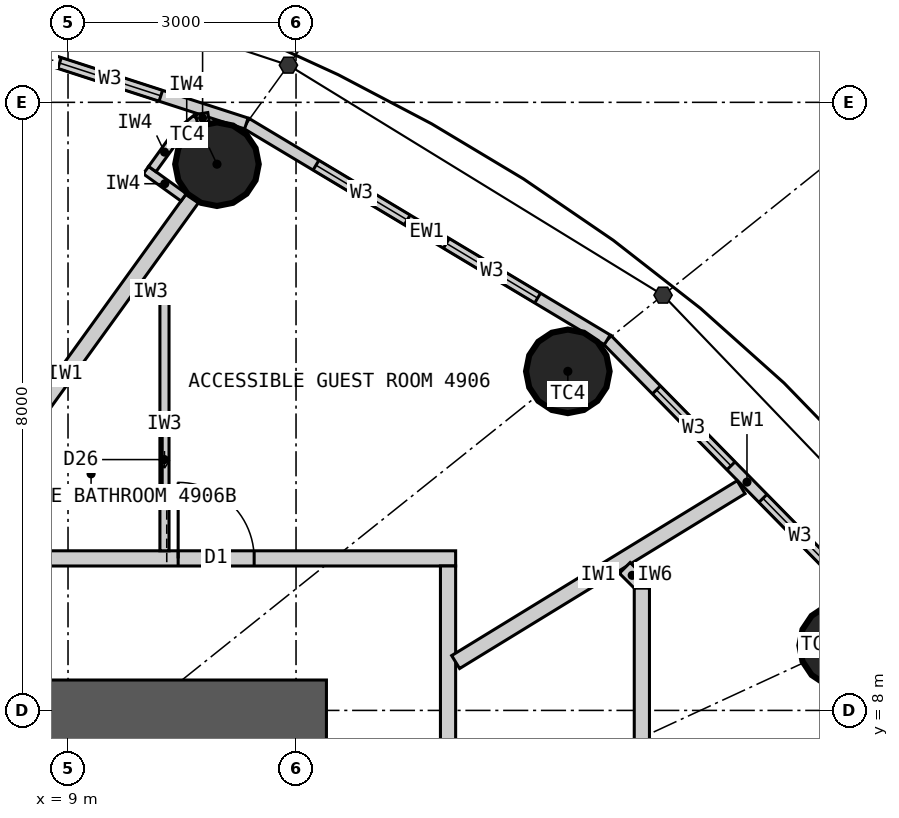
"""IFC4 building model, lengths in metres.
Left out: names, types, materials, properties, quantities, classifications, styles, units other than length and angle.
Written with IfcOpenShell. Run it as: python <this file> out.ifc"""

import sys

from ifc_helpers import new_model, si_unit, direction, frame, frame_2d, origin, origin_2d, place, context, subcontext, project, spatial, rectangle, circle, extrude, clip, halfspace, element, fill, save


model = new_model("IFC4")
c1 = context("Model", 3, precision=1e-05, world=origin(), true_north=direction((0.0, 1.0)))
c2 = subcontext(c1, "Body", "Model", "MODEL_VIEW")
j1 = project(units=[si_unit("LENGTHUNIT", "METRE"), si_unit("PLANEANGLEUNIT", "RADIAN")], contexts=[c1])
p1 = place(None, origin())
s1 = spatial("IfcSite", under=j1, at=p1, CompositionType="ELEMENT")
p2 = place(p1, origin())
s2 = spatial("IfcBuilding", under=s1, at=p2, CompositionType="ELEMENT")
p3 = place(p2, frame((0.0, 0.0, 183.0)))
s3 = spatial("IfcBuildingStorey", under=s2, at=p3, CompositionType="ELEMENT", Elevation=183.0)
for number, where, z_axis, x_axis in (
    (1, (19.172, 8.855, 0.0), (0.0, 0.0, 1.0), (1.0, 0.0, 0.0)),
    (2, (15.576, 12.461, 0.0), (0.0, 0.0, 1.0), (1.0, 0.0, 0.0)),
    (3, (10.96, 15.186, 0.0), (0.0, 0.0, 1.0), (1.0, 0.0, 0.0)),
):
    element("IfcColumn", number, at=place(p3, frame(where, z_axis=z_axis, x_axis=x_axis)), inside=s3, PredefinedType="COLUMN", context=c2, shape_type="Clipping", body=[
        clip(extrude(circle(Radius=0.55, at=origin_2d()), origin(), (0.0, 0.0, 1.0), 3.3), halfspace(frame((0.0, 0.0, 2.25), z_axis=(0.0, 0.0, 1.0), x_axis=(1.0, 0.0, 0.0)), False)),
    ])
p4 = place(p3, frame((-12.4, 8.0, 0.0), z_axis=(0.0, 0.0, 1.0), x_axis=(1.0, 0.0, 0.0)))
e4 = element("IfcWall", 4, at=p4, inside=s3, PredefinedType="SHEAR", context=c2, shape_type="SweptSolid", body=[
    extrude(rectangle(XDim=24.8, YDim=0.8, at=frame_2d((12.4, 0.0))), origin(), (0.0, 0.0, 1.0), 3.3),
])
p5 = place(p4, frame((11.1, 0.0, 0.0)))
e5 = element("IfcOpeningElement", 5, at=p5, cuts=e4, PredefinedType="OPENING", context=c2, shape_type="SweptSolid", body=[
    extrude(rectangle(XDim=1.2, YDim=2.2, at=frame_2d((0.6, 1.1))), frame((0.0, 0.41, 0.0), z_axis=(0.0, -1.0, 0.0), x_axis=(1.0, 0.0, 0.0)), (0.0, 0.0, 1.0), 0.82),
])
p6 = place(p4, frame((18.7, 0.0, 0.0)))
e6 = element("IfcOpeningElement", 6, at=p6, cuts=e4, PredefinedType="OPENING", context=c2, shape_type="SweptSolid", body=[
    extrude(rectangle(XDim=0.9, YDim=2.2, at=frame_2d((0.45, 1.1))), frame((0.0, 0.41, 0.0), z_axis=(0.0, -1.0, 0.0), x_axis=(1.0, 0.0, 0.0)), (0.0, 0.0, 1.0), 0.82),
])
p7 = place(p3, frame((19.772, 9.132, 0.0), z_axis=(0.0, 0.0, 1.0), x_axis=(-0.700727467776, 0.71342905457, 0.0)))
e7 = element("IfcWall", 7, at=p7, inside=s3, PredefinedType="ELEMENTEDWALL", context=c2, shape_type="SweptSolid", body=[
    extrude(rectangle(XDim=5.247, YDim=0.15, at=frame_2d((2.624, 0.0))), origin(), (0.0, 0.0, 1.0), 3.05),
])
p8 = place(p7, frame((0.924, 0.0, 0.9)))
e8 = element("IfcOpeningElement", 8, at=p8, cuts=e7, PredefinedType="OPENING", context=c2, shape_type="SweptSolid", body=[
    extrude(rectangle(XDim=1.4, YDim=1.9, at=frame_2d((0.7, 0.95))), frame((0.0, 0.085, 0.0), z_axis=(0.0, -1.0, 0.0), x_axis=(1.0, 0.0, 0.0)), (0.0, 0.0, 1.0), 0.17),
])
p9 = place(p7, frame((2.924, 0.0, 0.9)))
e9 = element("IfcOpeningElement", 9, at=p9, cuts=e7, PredefinedType="OPENING", context=c2, shape_type="SweptSolid", body=[
    extrude(rectangle(XDim=1.4, YDim=1.9, at=frame_2d((0.7, 0.95))), frame((0.0, 0.085, 0.0), z_axis=(0.0, -1.0, 0.0), x_axis=(1.0, 0.0, 0.0)), (0.0, 0.0, 1.0), 0.17),
])
p10 = place(p3, frame((16.095, 12.876, 0.0), z_axis=(0.0, 0.0, 1.0), x_axis=(-0.857695199231, 0.514158482587, 0.0)))
e10 = element("IfcWall", 10, at=p10, inside=s3, PredefinedType="ELEMENTEDWALL", context=c2, shape_type="SweptSolid", body=[
    extrude(rectangle(XDim=5.536, YDim=0.15, at=frame_2d((2.768, 0.0))), origin(), (0.0, 0.0, 1.0), 3.05),
])
p11 = place(p10, frame((1.068, 0.0, 0.9)))
e11 = element("IfcOpeningElement", 11, at=p11, cuts=e10, PredefinedType="OPENING", context=c2, shape_type="SweptSolid", body=[
    extrude(rectangle(XDim=1.4, YDim=1.9, at=frame_2d((0.7, 0.95))), frame((0.0, 0.085, 0.0), z_axis=(0.0, -1.0, 0.0), x_axis=(1.0, 0.0, 0.0)), (0.0, 0.0, 1.0), 0.17),
])
p12 = place(p10, frame((3.068, 0.0, 0.9)))
e12 = element("IfcOpeningElement", 12, at=p12, cuts=e10, PredefinedType="OPENING", context=c2, shape_type="SweptSolid", body=[
    extrude(rectangle(XDim=1.4, YDim=1.9, at=frame_2d((0.7, 0.95))), frame((0.0, 0.085, 0.0), z_axis=(0.0, -1.0, 0.0), x_axis=(1.0, 0.0, 0.0)), (0.0, 0.0, 1.0), 0.17),
])
p13 = place(p3, frame((11.346, 15.722, 0.0), z_axis=(0.0, 0.0, 1.0), x_axis=(-0.951432482129, 0.307857486429, 0.0)))
e13 = element("IfcWall", 13, at=p13, inside=s3, PredefinedType="ELEMENTEDWALL", context=c2, shape_type="SweptSolid", body=[
    extrude(rectangle(XDim=5.766, YDim=0.15, at=frame_2d((2.883, 0.0))), origin(), (0.0, 0.0, 1.0), 3.05),
])
p14 = place(p13, frame((1.183, 0.0, 0.9)))
e14 = element("IfcOpeningElement", 14, at=p14, cuts=e13, PredefinedType="OPENING", context=c2, shape_type="SweptSolid", body=[
    extrude(rectangle(XDim=1.4, YDim=1.9, at=frame_2d((0.7, 0.95))), frame((0.0, 0.085, 0.0), z_axis=(0.0, -1.0, 0.0), x_axis=(1.0, 0.0, 0.0)), (0.0, 0.0, 1.0), 0.17),
])
p15 = place(p13, frame((3.183, 0.0, 0.9)))
e15 = element("IfcOpeningElement", 15, at=p15, cuts=e13, PredefinedType="OPENING", context=c2, shape_type="SweptSolid", body=[
    extrude(rectangle(XDim=1.4, YDim=1.9, at=frame_2d((0.7, 0.95))), frame((0.0, 0.085, 0.0), z_axis=(0.0, -1.0, 0.0), x_axis=(1.0, 0.0, 0.0)), (0.0, 0.0, 1.0), 0.17),
])
p16 = place(p3, frame((-14.1, 10.0, 0.0), z_axis=(0.0, 0.0, 1.0), x_axis=(1.0, 0.0, 0.0)))
e16 = element("IfcWall", 16, at=p16, inside=s3, PredefinedType="PARTITIONING", context=c2, shape_type="SweptSolid", body=[
    extrude(rectangle(XDim=28.2, YDim=0.2, at=frame_2d((14.1, 0.0))), origin(), (0.0, 0.0, 1.0), 3.05),
])
p17 = place(p16, frame((24.549, 0.0, 0.0)))
e17 = element("IfcOpeningElement", 17, at=p17, cuts=e16, PredefinedType="OPENING", context=c2, shape_type="SweptSolid", body=[
    extrude(rectangle(XDim=1.0, YDim=2.2, at=frame_2d((0.5, 1.1))), frame((0.0, 0.11, 0.0), z_axis=(0.0, -1.0, 0.0), x_axis=(1.0, 0.0, 0.0)), (0.0, 0.0, 1.0), 0.22),
])
p18 = place(p16, frame((18.829, 0.0, 0.0)))
e18 = element("IfcOpeningElement", 18, at=p18, cuts=e16, PredefinedType="OPENING", context=c2, shape_type="SweptSolid", body=[
    extrude(rectangle(XDim=1.0, YDim=2.2, at=frame_2d((0.5, 1.1))), frame((0.0, 0.11, 0.0), z_axis=(0.0, -1.0, 0.0), x_axis=(1.0, 0.0, 0.0)), (0.0, 0.0, 1.0), 0.22),
])
p19 = place(p16, frame((12.8, 0.0, 0.0)))
e19 = element("IfcOpeningElement", 19, at=p19, cuts=e16, PredefinedType="OPENING", context=c2, shape_type="SweptSolid", body=[
    extrude(rectangle(XDim=1.0, YDim=2.2, at=frame_2d((0.5, 1.1))), frame((0.0, 0.11, 0.0), z_axis=(0.0, -1.0, 0.0), x_axis=(1.0, 0.0, 0.0)), (0.0, 0.0, 1.0), 0.22),
])
p20 = place(p16, frame((5.25, 0.0, 0.0)))
e20 = element("IfcOpeningElement", 20, at=p20, cuts=e16, PredefinedType="OPENING", context=c2, shape_type="SweptSolid", body=[
    extrude(rectangle(XDim=1.0, YDim=2.2, at=frame_2d((0.5, 1.1))), frame((0.0, 0.11, 0.0), z_axis=(0.0, -1.0, 0.0), x_axis=(1.0, 0.0, 0.0)), (0.0, 0.0, 1.0), 0.22),
])
p21 = place(p3, frame((14.0, -9.9, 0.0), z_axis=(0.0, 0.0, 1.0), x_axis=(0.0, 1.0, 0.0)))
e21 = element("IfcWall", 21, at=p21, inside=s3, PredefinedType="PARTITIONING", context=c2, shape_type="SweptSolid", body=[
    extrude(rectangle(XDim=19.8, YDim=0.2, at=frame_2d((9.9, 0.0))), origin(), (0.0, 0.0, 1.0), 3.05),
])
p22 = place(p21, frame((1.1, 0.0, 0.0)))
e22 = element("IfcOpeningElement", 22, at=p22, cuts=e21, PredefinedType="OPENING", context=c2, shape_type="SweptSolid", body=[
    extrude(rectangle(XDim=1.0, YDim=2.2, at=frame_2d((0.5, 1.1))), frame((0.0, 0.11, 0.0), z_axis=(0.0, -1.0, 0.0), x_axis=(1.0, 0.0, 0.0)), (0.0, 0.0, 1.0), 0.22),
])
p23 = place(p21, frame((10.832, 0.0, 0.0)))
e23 = element("IfcOpeningElement", 23, at=p23, cuts=e21, PredefinedType="OPENING", context=c2, shape_type="SweptSolid", body=[
    extrude(rectangle(XDim=1.0, YDim=2.2, at=frame_2d((0.5, 1.1))), frame((0.0, 0.11, 0.0), z_axis=(0.0, -1.0, 0.0), x_axis=(1.0, 0.0, 0.0)), (0.0, 0.0, 1.0), 0.22),
])
p24 = place(p3, frame((14.1, 8.636, 0.0), z_axis=(0.0, 0.0, 1.0), x_axis=(0.852731884196, 0.522348862041, 0.0)))
e24 = element("IfcWall", 24, at=p24, inside=s3, PredefinedType="PARTITIONING", context=c2, shape_type="SweptSolid", body=[
    extrude(rectangle(XDim=4.404, YDim=0.2, at=frame_2d((2.202, 0.0))), origin(), (0.0, 0.0, 1.0), 3.05),
])
p25 = place(p3, frame((7.289, 10.1, 0.0), z_axis=(0.0, 0.0, 1.0), x_axis=(0.585222595178, 0.810872686735, 0.0)))
e25 = element("IfcWall", 25, at=p25, inside=s3, PredefinedType="PARTITIONING", context=c2, shape_type="SweptSolid", body=[
    extrude(rectangle(XDim=5.722, YDim=0.2, at=frame_2d((2.861, 0.0))), origin(), (0.0, 0.0, 1.0), 2.15),
])
p26 = place(p3, frame((16.55, -5.35, 0.0), z_axis=(0.0, 0.0, 1.0), x_axis=(0.0, 1.0, 0.0)))
e26 = element("IfcWall", 26, at=p26, inside=s3, PredefinedType="PARTITIONING", context=c2, shape_type="SweptSolid", body=[
    extrude(rectangle(XDim=14.959, YDim=0.2, at=frame_2d((7.479, 0.0))), origin(), (0.0, 0.0, 1.0), 3.05),
])
p27 = place(p26, frame((2.598, 0.0, 0.0)))
e27 = element("IfcOpeningElement", 27, at=p27, cuts=e26, PredefinedType="OPENING", context=c2, shape_type="SweptSolid", body=[
    extrude(rectangle(XDim=0.8, YDim=2.1, at=frame_2d((0.4, 1.05))), frame((0.0, 0.11, 0.0), z_axis=(0.0, -1.0, 0.0), x_axis=(1.0, 0.0, 0.0)), (0.0, 0.0, 1.0), 0.22),
])
p28 = place(p26, frame((11.27, 0.0, 0.0)))
e28 = element("IfcOpeningElement", 28, at=p28, cuts=e26, PredefinedType="OPENING", context=c2, shape_type="SweptSolid", body=[
    extrude(rectangle(XDim=0.8, YDim=2.1, at=frame_2d((0.4, 1.05))), frame((0.0, 0.11, 0.0), z_axis=(0.0, -1.0, 0.0), x_axis=(1.0, 0.0, 0.0)), (0.0, 0.0, 1.0), 0.22),
])
p29 = place(p26, frame((6.757, 0.0, 0.0)))
e29 = element("IfcOpeningElement", 29, at=p29, cuts=e26, PredefinedType="OPENING", context=c2, shape_type="SweptSolid", body=[
    extrude(rectangle(XDim=0.9, YDim=2.1, at=frame_2d((0.45, 1.05))), frame((0.0, 0.11, 0.0), z_axis=(0.0, -1.0, 0.0), x_axis=(1.0, 0.0, 0.0)), (0.0, 0.0, 1.0), 0.22),
])
p30 = place(p3, frame((16.521, 9.679, 0.0), z_axis=(0.0, 0.0, 1.0), x_axis=(-0.707106781187, 0.707106781187, 0.0)))
e30 = element("IfcWall", 30, at=p30, inside=s3, PredefinedType="PARTITIONING", context=c2, shape_type="SweptSolid", body=[
    extrude(rectangle(XDim=0.277, YDim=0.2, at=frame_2d((0.138, 0.0))), origin(), (0.0, 0.0, 1.0), 3.05),
])
p31 = place(p3, frame((9.843, 13.5, 0.0), z_axis=(0.0, 0.0, 1.0), x_axis=(1.0, 0.0, 0.0)))
e31 = element("IfcWall", 31, at=p31, inside=s3, PredefinedType="PARTITIONING", context=c2, shape_type="SweptSolid", body=[
    extrude(rectangle(XDim=0.486, YDim=0.12, at=frame_2d((0.243, 0.0))), origin(), (0.0, 0.0, 1.0), 3.05),
])
p32 = place(p3, frame((10.269, 10.1, 0.0), z_axis=(0.0, 0.0, 1.0), x_axis=(0.0, 1.0, 0.0)))
e32 = element("IfcWall", 32, at=p32, inside=s3, PredefinedType="PARTITIONING", context=c2, shape_type="SweptSolid", body=[
    extrude(rectangle(XDim=3.34, YDim=0.12, at=frame_2d((1.67, 0.0))), origin(), (0.0, 0.0, 1.0), 3.05),
])
p33 = place(p32, frame((0.75, 0.0, 0.0)))
e33 = element("IfcOpeningElement", 33, at=p33, cuts=e32, PredefinedType="OPENING", context=c2, shape_type="SweptSolid", body=[
    extrude(rectangle(XDim=0.9, YDim=2.1, at=frame_2d((0.45, 1.05))), frame((0.0, 0.07, 0.0), z_axis=(0.0, -1.0, 0.0), x_axis=(1.0, 0.0, 0.0)), (0.0, 0.0, 1.0), 0.14),
])
p34 = place(p3, frame((10.522, 14.75, 0.0), z_axis=(0.0, 0.0, 1.0), x_axis=(-0.811057588427, 0.584966313777, 0.0)))
e34 = element("IfcWall", 34, at=p34, inside=s3, PredefinedType="PARTITIONING", context=c2, shape_type="SweptSolid", body=[
    extrude(rectangle(XDim=0.612, YDim=0.12, at=frame_2d((0.306, 0.0))), origin(), (0.0, 0.0, 1.0), 3.05),
])
p35 = place(p3, frame((10.109, 15.122, 0.0), z_axis=(0.0, 0.0, 1.0), x_axis=(0.585344718358, 0.810784534072, 0.0)))
e35 = element("IfcWall", 35, at=p35, inside=s3, PredefinedType="PARTITIONING", context=c2, shape_type="SweptSolid", body=[
    extrude(rectangle(XDim=0.55, YDim=0.12, at=frame_2d((0.275, 0.0))), origin(), (0.0, 0.0, 1.0), 3.05),
])
p36 = place(p3, frame((10.431, 15.568, 0.0), z_axis=(0.0, 0.0, 1.0), x_axis=(0.77505137267, 0.631898227345, 0.0)))
e36 = element("IfcWall", 36, at=p36, inside=s3, PredefinedType="PARTITIONING", context=c2, shape_type="SweptSolid", body=[
    extrude(rectangle(XDim=0.338, YDim=0.12, at=frame_2d((0.169, 0.0))), origin(), (0.0, 0.0, 1.0), 3.05),
])
p37 = place(p3, frame((10.693, 15.781, 0.0), z_axis=(0.0, 0.0, 1.0), x_axis=(0.987256785332, 0.159135287777, 0.0)))
e37 = element("IfcWall", 37, at=p37, inside=s3, PredefinedType="PARTITIONING", context=c2, shape_type="SweptSolid", body=[
    extrude(rectangle(XDim=0.158, YDim=0.12, at=frame_2d((0.079, 0.0))), origin(), (0.0, 0.0, 1.0), 3.05),
])
p38 = place(p8, origin())
e38 = element("IfcWindow", 38, at=p38, inside=s3, PartitioningType="SINGLE_PANEL", PredefinedType="WINDOW", context=c2, shape_type="SweptSolid", body=[
    extrude(rectangle(XDim=1.4, YDim=1.9, at=frame_2d((0.7, 0.95))), frame((0.0, 0.03, 0.0), z_axis=(0.0, -1.0, 0.0), x_axis=(1.0, 0.0, 0.0)), (0.0, 0.0, 1.0), 0.06),
])
fill(e8, e38)
p39 = place(p9, origin())
e39 = element("IfcWindow", 39, at=p39, inside=s3, PartitioningType="SINGLE_PANEL", PredefinedType="WINDOW", context=c2, shape_type="SweptSolid", body=[
    extrude(rectangle(XDim=1.4, YDim=1.9, at=frame_2d((0.7, 0.95))), frame((0.0, 0.03, 0.0), z_axis=(0.0, -1.0, 0.0), x_axis=(1.0, 0.0, 0.0)), (0.0, 0.0, 1.0), 0.06),
])
fill(e9, e39)
p40 = place(p11, origin())
e40 = element("IfcWindow", 40, at=p40, inside=s3, PartitioningType="SINGLE_PANEL", PredefinedType="WINDOW", context=c2, shape_type="SweptSolid", body=[
    extrude(rectangle(XDim=1.4, YDim=1.9, at=frame_2d((0.7, 0.95))), frame((0.0, 0.03, 0.0), z_axis=(0.0, -1.0, 0.0), x_axis=(1.0, 0.0, 0.0)), (0.0, 0.0, 1.0), 0.06),
])
fill(e11, e40)
p41 = place(p12, origin())
e41 = element("IfcWindow", 41, at=p41, inside=s3, PartitioningType="SINGLE_PANEL", PredefinedType="WINDOW", context=c2, shape_type="SweptSolid", body=[
    extrude(rectangle(XDim=1.4, YDim=1.9, at=frame_2d((0.7, 0.95))), frame((0.0, 0.03, 0.0), z_axis=(0.0, -1.0, 0.0), x_axis=(1.0, 0.0, 0.0)), (0.0, 0.0, 1.0), 0.06),
])
fill(e12, e41)
p42 = place(p14, origin())
e42 = element("IfcWindow", 42, at=p42, inside=s3, PartitioningType="SINGLE_PANEL", PredefinedType="WINDOW", context=c2, shape_type="SweptSolid", body=[
    extrude(rectangle(XDim=1.4, YDim=1.9, at=frame_2d((0.7, 0.95))), frame((0.0, 0.03, 0.0), z_axis=(0.0, -1.0, 0.0), x_axis=(1.0, 0.0, 0.0)), (0.0, 0.0, 1.0), 0.06),
])
fill(e14, e42)
p43 = place(p33, origin())
e43 = element("IfcDoor", 43, at=p43, inside=s3, OperationType="SLIDING_TO_LEFT", PredefinedType="DOOR", context=c2, shape_type="SweptSolid", body=[
    extrude(rectangle(XDim=0.9, YDim=2.1, at=frame_2d((0.45, 1.05))), frame((0.0, 0.025, 0.0), z_axis=(0.0, -1.0, 0.0), x_axis=(1.0, 0.0, 0.0)), (0.0, 0.0, 1.0), 0.05),
])
fill(e33, e43)
p44 = place(p17, origin())
e44 = element("IfcDoor", 44, at=p44, inside=s3, OperationType="SINGLE_SWING_LEFT", PredefinedType="DOOR", context=c2, shape_type="SweptSolid", body=[
    extrude(rectangle(XDim=1.0, YDim=2.2, at=frame_2d((0.5, 1.1))), frame((0.0, 0.025, 0.0), z_axis=(0.0, -1.0, 0.0), x_axis=(1.0, 0.0, 0.0)), (0.0, 0.0, 1.0), 0.05),
])
fill(e17, e44)
save(model, sys.argv[1])
